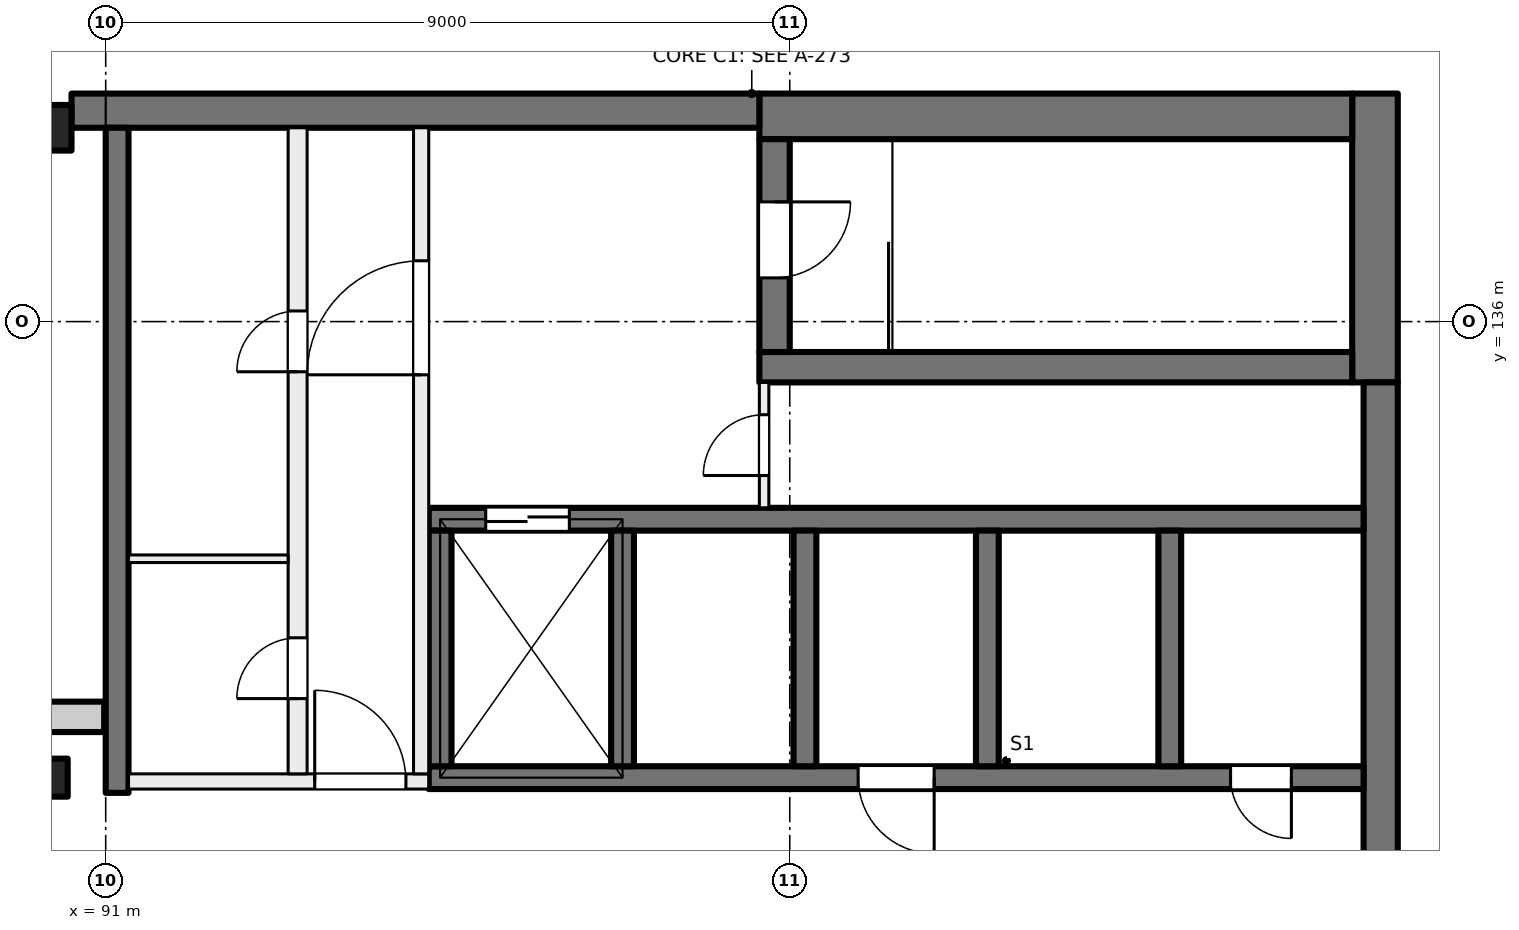
"""IFC4 building model, lengths in metres.
Left out: names, types, materials, properties, quantities, classifications, styles, units other than length and angle.
Written with IfcOpenShell. Run it as: python <this file> out.ifc"""

import sys

from ifc_helpers import new_model, si_unit, direction, frame, frame_2d, origin, origin_2d, place, context, subcontext, project, spatial, rectangle, extrude, element, fill, save


model = new_model("IFC4")
c1 = context("Model", 3, precision=1e-05, world=origin(), true_north=direction((0.0, 1.0)))
c2 = subcontext(c1, "Body", "Model", "MODEL_VIEW")
j1 = project(units=[si_unit("LENGTHUNIT", "METRE"), si_unit("PLANEANGLEUNIT", "RADIAN")], contexts=[c1])
p1 = place(None, origin())
s1 = spatial("IfcSite", under=j1, at=p1, CompositionType="ELEMENT")
p2 = place(p1, origin())
s2 = spatial("IfcBuilding", under=s1, at=p2, CompositionType="ELEMENT")
p3 = place(p2, frame((0.0, 0.0, 295.5)))
s3 = spatial("IfcBuildingStorey", under=s2, at=p3, CompositionType="ELEMENT", Elevation=295.5)
p4 = place(p3, frame((90.25, 130.0, 0.0), z_axis=(0.0, 0.0, 1.0), x_axis=(1.0, 0.0, 0.0)))
e1 = element("IfcColumn", 1, at=p4, inside=s3, PredefinedType="COLUMN", context=c2, shape_type="SweptSolid", body=[
    extrude(rectangle(XDim=0.5, YDim=0.5, at=origin_2d()), origin(), (0.0, 0.0, 1.0), 4.5),
])
p5 = place(p3, frame((90.25, 138.55, 0.0), z_axis=(0.0, 0.0, 1.0), x_axis=(1.0, 0.0, 0.0)))
e2 = element("IfcColumn", 2, at=p5, inside=s3, PredefinedType="COLUMN", context=c2, shape_type="SweptSolid", body=[
    extrude(rectangle(XDim=0.6, YDim=0.6, at=origin_2d()), origin(), (0.0, 0.0, 1.0), 4.5),
])
p6 = place(p3, frame((107.7, 139.0, 0.0), z_axis=(0.0, 0.0, 1.0), x_axis=(0.0, -1.0, 0.0)))
e3 = element("IfcWall", 3, at=p6, inside=s3, PredefinedType="SHEAR", context=c2, shape_type="SweptSolid", body=[
    extrude(rectangle(XDim=3.8, YDim=0.6, at=frame_2d((1.9, 0.0))), origin(), (0.0, 0.0, 1.0), 4.5),
])
p7 = place(p3, frame((107.775, 135.2, 0.0), z_axis=(0.0, 0.0, 1.0), x_axis=(0.0, -1.0, 0.0)))
e4 = element("IfcWall", 4, at=p7, inside=s3, PredefinedType="SHEAR", context=c2, shape_type="SweptSolid", body=[
    extrude(rectangle(XDim=14.4, YDim=0.45, at=frame_2d((7.2, 0.0))), origin(), (0.0, 0.0, 1.0), 4.5),
])
p8 = place(p3, frame((107.4, 138.7, 0.0), z_axis=(0.0, 0.0, 1.0), x_axis=(-1.0, 0.0, 0.0)))
e5 = element("IfcWall", 5, at=p8, inside=s3, PredefinedType="SHEAR", context=c2, shape_type="SweptSolid", body=[
    extrude(rectangle(XDim=7.8, YDim=0.6, at=frame_2d((3.9, 0.0))), origin(), (0.0, 0.0, 1.0), 4.5),
])
p9 = place(p3, frame((99.6, 138.775, 0.0), z_axis=(0.0, 0.0, 1.0), x_axis=(-1.0, 0.0, 0.0)))
e6 = element("IfcWall", 6, at=p9, inside=s3, PredefinedType="SHEAR", context=c2, shape_type="SweptSolid", body=[
    extrude(rectangle(XDim=9.05, YDim=0.45, at=frame_2d((4.525, 0.0))), origin(), (0.0, 0.0, 1.0), 4.5),
])
p10 = place(p3, frame((107.4, 135.4, 0.0), z_axis=(0.0, 0.0, 1.0), x_axis=(-1.0, 0.0, 0.0)))
e7 = element("IfcWall", 7, at=p10, inside=s3, PredefinedType="SHEAR", context=c2, shape_type="SweptSolid", body=[
    extrude(rectangle(XDim=7.8, YDim=0.4, at=frame_2d((3.9, 0.0))), origin(), (0.0, 0.0, 1.0), 4.5),
])
p11 = place(p3, frame((99.8, 138.4, 0.0), z_axis=(0.0, 0.0, 1.0), x_axis=(0.0, -1.0, 0.0)))
e8 = element("IfcWall", 8, at=p11, inside=s3, PredefinedType="SHEAR", context=c2, shape_type="SweptSolid", body=[
    extrude(rectangle(XDim=2.8, YDim=0.4, at=frame_2d((1.4, 0.0))), origin(), (0.0, 0.0, 1.0), 4.5),
])
p12 = place(p11, frame((0.825, 0.0, 0.0)))
e9 = element("IfcOpeningElement", 9, at=p12, cuts=e8, PredefinedType="OPENING", context=c2, shape_type="SweptSolid", body=[
    extrude(rectangle(XDim=1.0, YDim=2.1, at=frame_2d((0.5, 1.05))), frame((0.0, 0.21, 0.0), z_axis=(0.0, -1.0, 0.0), x_axis=(1.0, 0.0, 0.0)), (0.0, 0.0, 1.0), 0.42),
])
p13 = place(p3, frame((107.55, 130.0, 0.0), z_axis=(0.0, 0.0, 1.0), x_axis=(-1.0, 0.0, 0.0)))
e10 = element("IfcWall", 10, at=p13, inside=s3, PredefinedType="SHEAR", context=c2, shape_type="SweptSolid", body=[
    extrude(rectangle(XDim=12.3, YDim=0.3, at=frame_2d((6.15, 0.0))), origin(), (0.0, 0.0, 1.0), 4.5),
])
p14 = place(p13, frame((0.95, 0.0, 0.0)))
e11 = element("IfcOpeningElement", 11, at=p14, cuts=e10, PredefinedType="OPENING", context=c2, shape_type="SweptSolid", body=[
    extrude(rectangle(XDim=0.8, YDim=2.1, at=frame_2d((0.4, 1.05))), frame((0.0, 0.16, 0.0), z_axis=(0.0, -1.0, 0.0), x_axis=(1.0, 0.0, 0.0)), (0.0, 0.0, 1.0), 0.32),
])
p15 = place(p13, frame((5.65, 0.0, 0.0)))
e12 = element("IfcOpeningElement", 12, at=p15, cuts=e10, PredefinedType="OPENING", context=c2, shape_type="SweptSolid", body=[
    extrude(rectangle(XDim=1.0, YDim=2.1, at=frame_2d((0.5, 1.05))), frame((0.0, 0.16, 0.0), z_axis=(0.0, -1.0, 0.0), x_axis=(1.0, 0.0, 0.0)), (0.0, 0.0, 1.0), 0.32),
])
p16 = place(p3, frame((107.55, 133.4, 0.0), z_axis=(0.0, 0.0, 1.0), x_axis=(-1.0, 0.0, 0.0)))
e13 = element("IfcWall", 13, at=p16, inside=s3, PredefinedType="SHEAR", context=c2, shape_type="SweptSolid", body=[
    extrude(rectangle(XDim=12.3, YDim=0.3, at=frame_2d((6.15, 0.0))), origin(), (0.0, 0.0, 1.0), 4.5),
])
p17 = place(p16, frame((10.45, 0.0, 0.0)))
e14 = element("IfcOpeningElement", 14, at=p17, cuts=e13, PredefinedType="OPENING", context=c2, shape_type="SweptSolid", body=[
    extrude(rectangle(XDim=1.1, YDim=2.1, at=frame_2d((0.55, 1.05))), frame((0.0, 0.16, 0.0), z_axis=(0.0, -1.0, 0.0), x_axis=(1.0, 0.0, 0.0)), (0.0, 0.0, 1.0), 0.32),
])
for number, where, z_axis, x_axis in (
    (15, (105.0, 133.25, 0.0), (0.0, 0.0, 1.0), (0.0, -1.0, 0.0)),
    (16, (102.6, 133.25, 0.0), (0.0, 0.0, 1.0), (0.0, -1.0, 0.0)),
    (17, (100.2, 133.25, 0.0), (0.0, 0.0, 1.0), (0.0, -1.0, 0.0)),
    (18, (97.8, 133.25, 0.0), (0.0, 0.0, 1.0), (0.0, -1.0, 0.0)),
    (19, (95.4, 133.25, 0.0), (0.0, 0.0, 1.0), (0.0, -1.0, 0.0)),
):
    element("IfcWall", number, at=place(p3, frame(where, z_axis=z_axis, x_axis=x_axis)), inside=s3, PredefinedType="SHEAR", context=c2, shape_type="SweptSolid", body=[
        extrude(rectangle(XDim=3.1, YDim=0.3, at=frame_2d((1.55, 0.0))), origin(), (0.0, 0.0, 1.0), 4.5),
    ])
p18 = place(p3, frame((91.15, 138.55, 0.0), z_axis=(0.0, 0.0, 1.0), x_axis=(0.0, -1.0, 0.0)))
e20 = element("IfcWall", 20, at=p18, inside=s3, PredefinedType="SHEAR", context=c2, shape_type="SweptSolid", body=[
    extrude(rectangle(XDim=8.75, YDim=0.3, at=frame_2d((4.375, 0.0))), origin(), (0.0, 0.0, 1.0), 4.5),
])
p19 = place(p3, frame((72.42, 130.8, 0.0), z_axis=(0.0, 0.0, 1.0), x_axis=(1.0, 0.0, 0.0)))
e21 = element("IfcWall", 21, at=p19, inside=s3, PredefinedType="SOLIDWALL", context=c2, shape_type="SweptSolid", body=[
    extrude(rectangle(XDim=18.56, YDim=0.4, at=frame_2d((9.28, 0.0))), origin(), (0.0, 0.0, 1.0), 4.125),
])
p20 = place(p3, frame((91.3, 129.95, 0.0), z_axis=(0.0, 0.0, 1.0), x_axis=(1.0, 0.0, 0.0)))
e22 = element("IfcWall", 22, at=p20, inside=s3, PredefinedType="PARTITIONING", context=c2, shape_type="SweptSolid", body=[
    extrude(rectangle(XDim=3.95, YDim=0.2, at=frame_2d((1.975, 0.0))), origin(), (0.0, 0.0, 1.0), 4.125),
])
p21 = place(p20, frame((2.45, 0.0, 0.0)))
e23 = element("IfcOpeningElement", 23, at=p21, cuts=e22, PredefinedType="OPENING", context=c2, shape_type="SweptSolid", body=[
    extrude(rectangle(XDim=1.2, YDim=2.1, at=frame_2d((0.6, 1.05))), frame((0.0, 0.11, 0.0), z_axis=(0.0, -1.0, 0.0), x_axis=(1.0, 0.0, 0.0)), (0.0, 0.0, 1.0), 0.22),
])
p22 = place(p3, frame((95.15, 130.05, 0.0), z_axis=(0.0, 0.0, 1.0), x_axis=(0.0, 1.0, 0.0)))
e24 = element("IfcWall", 24, at=p22, inside=s3, PredefinedType="PARTITIONING", context=c2, shape_type="SweptSolid", body=[
    extrude(rectangle(XDim=8.5, YDim=0.2, at=frame_2d((4.25, 0.0))), origin(), (0.0, 0.0, 1.0), 4.125),
])
p23 = place(p22, frame((5.25, 0.0, 0.0)))
e25 = element("IfcOpeningElement", 25, at=p23, cuts=e24, PredefinedType="OPENING", context=c2, shape_type="SweptSolid", body=[
    extrude(rectangle(XDim=1.5, YDim=2.1, at=frame_2d((0.75, 1.05))), frame((0.0, 0.11, 0.0), z_axis=(0.0, -1.0, 0.0), x_axis=(1.0, 0.0, 0.0)), (0.0, 0.0, 1.0), 0.22),
])
p24 = place(p3, frame((93.525, 130.05, 0.0), z_axis=(0.0, 0.0, 1.0), x_axis=(0.0, 1.0, 0.0)))
e26 = element("IfcWall", 26, at=p24, inside=s3, PredefinedType="PARTITIONING", context=c2, shape_type="SweptSolid", body=[
    extrude(rectangle(XDim=8.5, YDim=0.25, at=frame_2d((4.25, 0.0))), origin(), (0.0, 0.0, 1.0), 4.125),
])
p25 = place(p24, frame((0.99, 0.0, 0.0)))
e27 = element("IfcOpeningElement", 27, at=p25, cuts=e26, PredefinedType="OPENING", context=c2, shape_type="SweptSolid", body=[
    extrude(rectangle(XDim=0.8, YDim=2.1, at=frame_2d((0.4, 1.05))), frame((0.0, 0.135, 0.0), z_axis=(0.0, -1.0, 0.0), x_axis=(1.0, 0.0, 0.0)), (0.0, 0.0, 1.0), 0.27),
])
p26 = place(p24, frame((5.29, 0.0, 0.0)))
e28 = element("IfcOpeningElement", 28, at=p26, cuts=e26, PredefinedType="OPENING", context=c2, shape_type="SweptSolid", body=[
    extrude(rectangle(XDim=0.8, YDim=2.1, at=frame_2d((0.4, 1.05))), frame((0.0, 0.135, 0.0), z_axis=(0.0, -1.0, 0.0), x_axis=(1.0, 0.0, 0.0)), (0.0, 0.0, 1.0), 0.27),
])
p27 = place(p3, frame((99.663, 133.55, 0.0), z_axis=(0.0, 0.0, 1.0), x_axis=(0.0, 1.0, 0.0)))
e29 = element("IfcWall", 29, at=p27, inside=s3, PredefinedType="PARTITIONING", context=c2, shape_type="SweptSolid", body=[
    extrude(rectangle(XDim=1.65, YDim=0.125, at=frame_2d((0.825, 0.0))), origin(), (0.0, 0.0, 1.0), 4.125),
])
p28 = place(p27, frame((0.425, 0.0, 0.0)))
e30 = element("IfcOpeningElement", 30, at=p28, cuts=e29, PredefinedType="OPENING", context=c2, shape_type="SweptSolid", body=[
    extrude(rectangle(XDim=0.8, YDim=2.1, at=frame_2d((0.4, 1.05))), frame((0.0, 0.073, 0.0), z_axis=(0.0, -1.0, 0.0), x_axis=(1.0, 0.0, 0.0)), (0.0, 0.0, 1.0), 0.145),
])
p29 = place(p3, frame((91.3, 132.88, 0.0), z_axis=(0.0, 0.0, 1.0), x_axis=(1.0, 0.0, 0.0)))
e31 = element("IfcWall", 31, at=p29, inside=s3, PredefinedType="PARTITIONING", context=c2, shape_type="SweptSolid", body=[
    extrude(rectangle(XDim=2.1, YDim=0.1, at=frame_2d((1.05, 0.0))), origin(), (0.0, 0.0, 1.0), 4.125),
])
p30 = place(p14, origin())
e32 = element("IfcDoor", 32, at=p30, inside=s3, OperationType="SINGLE_SWING_RIGHT", PredefinedType="DOOR", context=c2, shape_type="SweptSolid", body=[
    extrude(rectangle(XDim=0.8, YDim=2.1, at=frame_2d((0.4, 1.05))), frame((0.0, 0.025, 0.0), z_axis=(0.0, -1.0, 0.0), x_axis=(1.0, 0.0, 0.0)), (0.0, 0.0, 1.0), 0.05),
])
fill(e11, e32)
p31 = place(p15, origin())
e33 = element("IfcDoor", 33, at=p31, inside=s3, OperationType="SINGLE_SWING_LEFT", PredefinedType="DOOR", context=c2, shape_type="SweptSolid", body=[
    extrude(rectangle(XDim=1.0, YDim=2.1, at=frame_2d((0.5, 1.05))), frame((0.0, 0.025, 0.0), z_axis=(0.0, -1.0, 0.0), x_axis=(1.0, 0.0, 0.0)), (0.0, 0.0, 1.0), 0.05),
])
fill(e12, e33)
p32 = place(p21, origin())
e34 = element("IfcDoor", 34, at=p32, inside=s3, OperationType="DOUBLE_DOOR_SINGLE_SWING", PredefinedType="DOOR", context=c2, shape_type="SweptSolid", body=[
    extrude(rectangle(XDim=1.2, YDim=2.1, at=frame_2d((0.6, 1.05))), frame((0.0, 0.025, 0.0), z_axis=(0.0, -1.0, 0.0), x_axis=(1.0, 0.0, 0.0)), (0.0, 0.0, 1.0), 0.05),
])
fill(e23, e34)
p33 = place(p23, origin())
e35 = element("IfcDoor", 35, at=p33, inside=s3, OperationType="DOUBLE_DOOR_SINGLE_SWING", PredefinedType="DOOR", context=c2, shape_type="SweptSolid", body=[
    extrude(rectangle(XDim=1.5, YDim=2.1, at=frame_2d((0.75, 1.05))), frame((0.0, 0.025, 0.0), z_axis=(0.0, -1.0, 0.0), x_axis=(1.0, 0.0, 0.0)), (0.0, 0.0, 1.0), 0.05),
])
fill(e25, e35)
p34 = place(p12, origin())
e36 = element("IfcDoor", 36, at=p34, inside=s3, OperationType="SINGLE_SWING_RIGHT", PredefinedType="DOOR", context=c2, shape_type="SweptSolid", body=[
    extrude(rectangle(XDim=1.0, YDim=2.1, at=frame_2d((0.5, 1.05))), frame((0.0, 0.025, 0.0), z_axis=(0.0, -1.0, 0.0), x_axis=(1.0, 0.0, 0.0)), (0.0, 0.0, 1.0), 0.05),
])
fill(e9, e36)
p35 = place(p28, origin())
e37 = element("IfcDoor", 37, at=p35, inside=s3, OperationType="SINGLE_SWING_LEFT", PredefinedType="DOOR", context=c2, shape_type="SweptSolid", body=[
    extrude(rectangle(XDim=0.8, YDim=2.1, at=frame_2d((0.4, 1.05))), frame((0.0, 0.025, 0.0), z_axis=(0.0, -1.0, 0.0), x_axis=(1.0, 0.0, 0.0)), (0.0, 0.0, 1.0), 0.05),
])
fill(e30, e37)
p36 = place(p25, origin())
e38 = element("IfcDoor", 38, at=p36, inside=s3, OperationType="SINGLE_SWING_RIGHT", PredefinedType="DOOR", context=c2, shape_type="SweptSolid", body=[
    extrude(rectangle(XDim=0.8, YDim=2.1, at=frame_2d((0.4, 1.05))), frame((0.0, 0.025, 0.0), z_axis=(0.0, -1.0, 0.0), x_axis=(1.0, 0.0, 0.0)), (0.0, 0.0, 1.0), 0.05),
])
fill(e27, e38)
p37 = place(p26, origin())
e39 = element("IfcDoor", 39, at=p37, inside=s3, OperationType="SINGLE_SWING_LEFT", PredefinedType="DOOR", context=c2, shape_type="SweptSolid", body=[
    extrude(rectangle(XDim=0.8, YDim=2.1, at=frame_2d((0.4, 1.05))), frame((0.0, 0.025, 0.0), z_axis=(0.0, -1.0, 0.0), x_axis=(1.0, 0.0, 0.0)), (0.0, 0.0, 1.0), 0.05),
])
fill(e28, e39)
p38 = place(p17, origin())
e40 = element("IfcDoor", 40, at=p38, inside=s3, OperationType="DOUBLE_DOOR_SLIDING", PredefinedType="DOOR", context=c2, shape_type="SweptSolid", body=[
    extrude(rectangle(XDim=1.1, YDim=2.1, at=frame_2d((0.55, 1.05))), frame((0.0, 0.025, 0.0), z_axis=(0.0, -1.0, 0.0), x_axis=(1.0, 0.0, 0.0)), (0.0, 0.0, 1.0), 0.05),
])
fill(e14, e40)
save(model, sys.argv[1])
